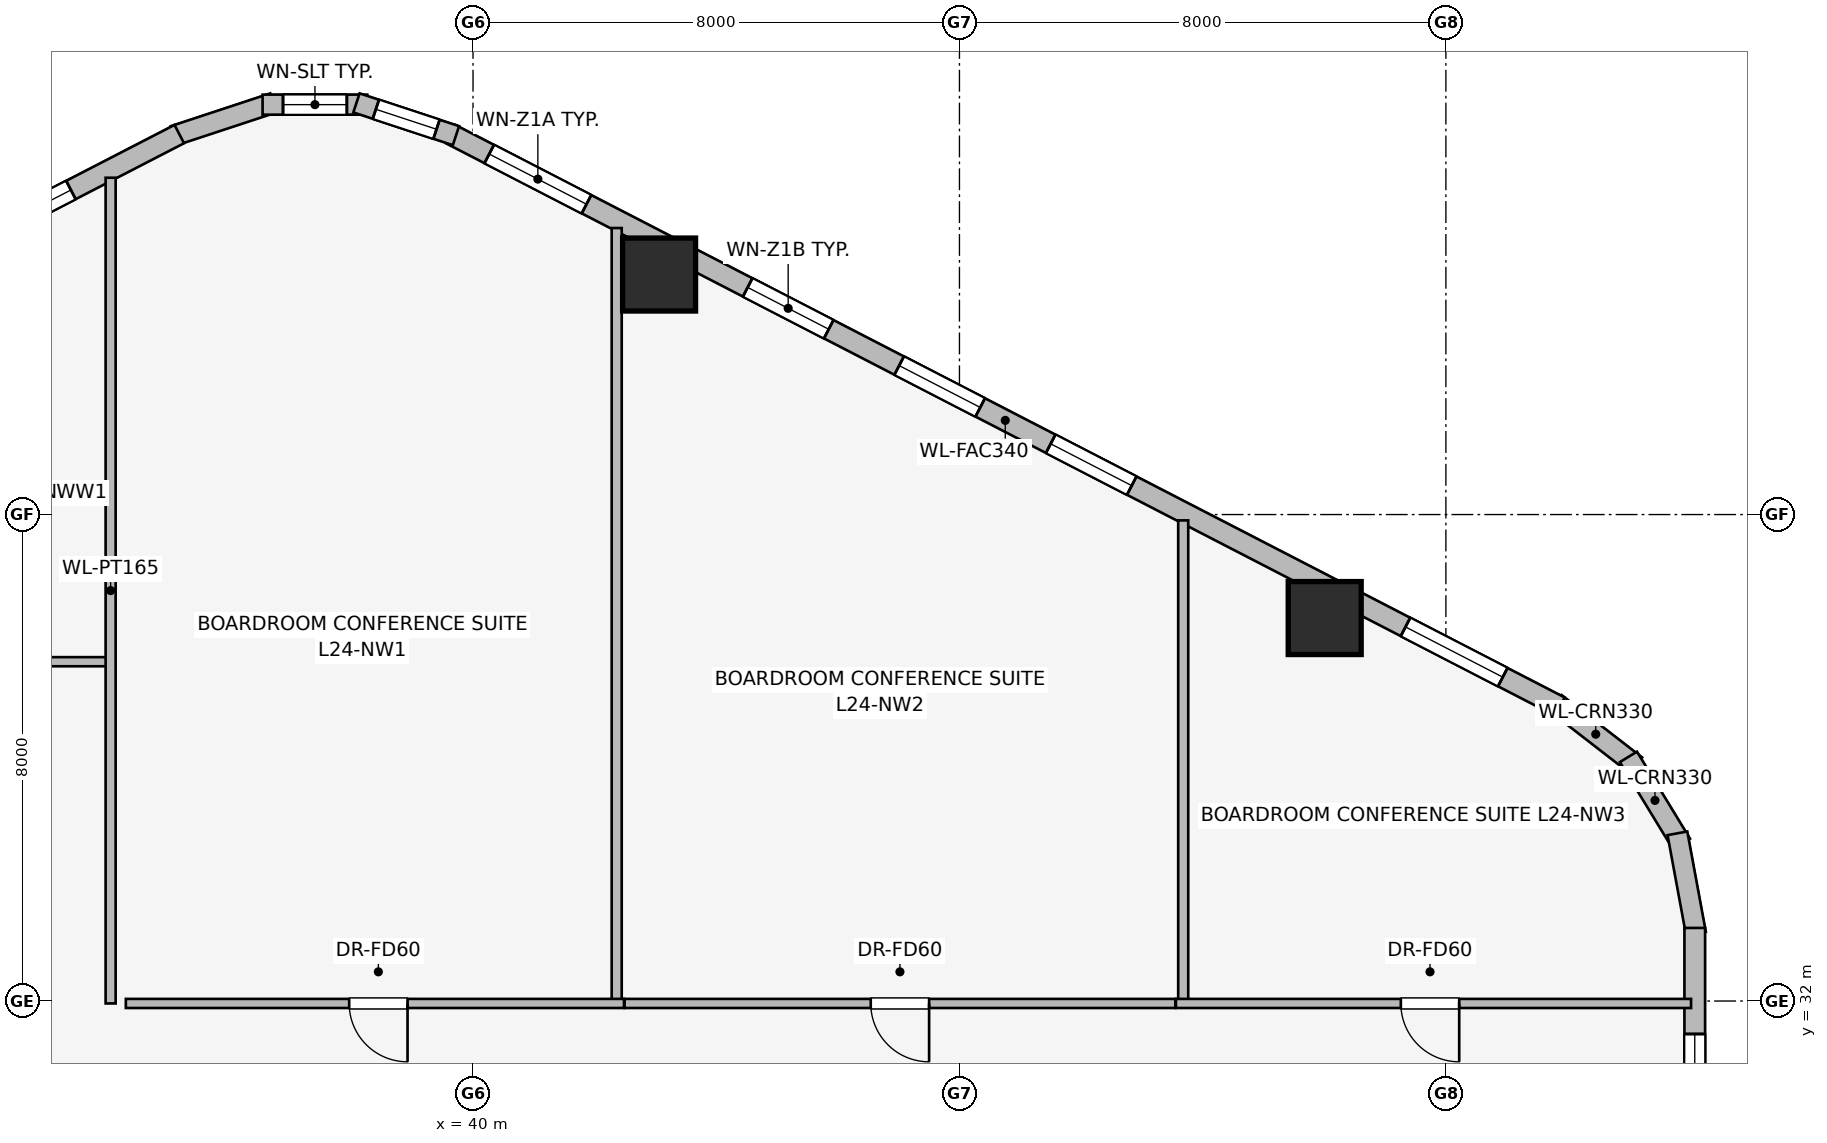
"""IFC4 building model, lengths in metres.
Left out: names, types, materials, properties, quantities, classifications, styles, units other than length and angle.
Written with IfcOpenShell. Run it as: python <this file> out.ifc"""

import sys

from ifc_helpers import new_model, si_unit, direction, frame, frame_2d, origin, origin_2d, place, context, subcontext, project, spatial, rectangle, extrude, element, fill, save


model = new_model("IFC4")
c1 = context("Model", 3, precision=1e-05, world=origin(), true_north=direction((0.0, 1.0)))
c2 = subcontext(c1, "Body", "Model", "MODEL_VIEW")
j1 = project(units=[si_unit("LENGTHUNIT", "METRE"), si_unit("PLANEANGLEUNIT", "RADIAN")], contexts=[c1])
p1 = place(None, origin())
s1 = spatial("IfcSite", under=j1, at=p1, CompositionType="ELEMENT")
p2 = place(p1, origin())
s2 = spatial("IfcBuilding", under=s1, at=p2, CompositionType="ELEMENT")
p3 = place(p2, frame((0.0, 0.0, 92.7)))
s3 = spatial("IfcBuildingStorey", under=s2, at=p3, CompositionType="ELEMENT", Elevation=92.7)
for number, where, z_axis, x_axis in (
    (1, (54.007, 38.298, 0.0), (0.0, 0.0, 1.0), (1.0, 0.0, 0.0)),
    (2, (43.06, 43.947, 0.0), (0.0, 0.0, 1.0), (1.0, 0.0, 0.0)),
):
    element("IfcColumn", number, at=place(p3, frame(where, z_axis=z_axis, x_axis=x_axis)), inside=s3, PredefinedType="COLUMN", context=c2, shape_type="SweptSolid", body=[
        extrude(rectangle(XDim=1.2, YDim=1.2, at=origin_2d()), origin(), (0.0, 0.0, 1.0), 3.65),
    ])
p4 = place(p3, frame((57.802, 36.901, 0.0), z_axis=(0.0, 0.0, 1.0), x_axis=(0.790691856293, -0.61221433207, 0.0)))
e3 = element("IfcWall", 3, at=p4, inside=s3, PredefinedType="STANDARD", context=c2, shape_type="SweptSolid", body=[
    extrude(rectangle(XDim=1.676, YDim=0.33, at=frame_2d((0.838, 0.0))), origin(), (0.0, 0.0, 1.0), 3.34),
])
p5 = place(p3, frame((59.002, 36.015, 0.0), z_axis=(0.0, 0.0, 1.0), x_axis=(0.520584129191, -0.853810379671, 0.0)))
e4 = element("IfcWall", 4, at=p5, inside=s3, PredefinedType="STANDARD", context=c2, shape_type="SweptSolid", body=[
    extrude(rectangle(XDim=1.677, YDim=0.33, at=frame_2d((0.838, 0.0))), origin(), (0.0, 0.0, 1.0), 3.34),
])
p6 = place(p3, frame((59.808, 34.758, 0.0), z_axis=(0.0, 0.0, 1.0), x_axis=(0.181714143354, -0.983351397063, 0.0)))
e5 = element("IfcWall", 5, at=p6, inside=s3, PredefinedType="STANDARD", context=c2, shape_type="SweptSolid", body=[
    extrude(rectangle(XDim=1.678, YDim=0.33, at=frame_2d((0.839, 0.0))), origin(), (0.0, 0.0, 1.0), 3.34),
])
p7 = place(p3, frame((39.631, 46.257, 0.0), z_axis=(0.0, 0.0, 1.0), x_axis=(0.888634413993, -0.458616264721, 0.0)))
e6 = element("IfcWall", 6, at=p7, inside=s3, PredefinedType="STANDARD", context=c2, shape_type="SweptSolid", body=[
    extrude(rectangle(XDim=20.531, YDim=0.34, at=frame_2d((10.266, 0.0))), origin(), (0.0, 0.0, 1.0), 2.634),
])
p8 = place(p7, frame((0.715, 0.0, 0.75)))
e7 = element("IfcOpeningElement", 7, at=p8, cuts=e6, PredefinedType="OPENING", context=c2, shape_type="SweptSolid", body=[
    extrude(rectangle(XDim=1.8, YDim=1.5, at=frame_2d((0.9, 0.75))), frame((0.0, 0.18, 0.0), z_axis=(0.0, -1.0, 0.0), x_axis=(1.0, 0.0, 0.0)), (0.0, 0.0, 1.0), 0.36),
])
p9 = place(p7, frame((5.498, 0.0, 0.75)))
e8 = element("IfcOpeningElement", 8, at=p9, cuts=e6, PredefinedType="OPENING", context=c2, shape_type="SweptSolid", body=[
    extrude(rectangle(XDim=1.5, YDim=1.5, at=frame_2d((0.75, 0.75))), frame((0.0, 0.18, 0.0), z_axis=(0.0, -1.0, 0.0), x_axis=(1.0, 0.0, 0.0)), (0.0, 0.0, 1.0), 0.36),
])
p10 = place(p7, frame((8.302, 0.0, 0.75)))
e9 = element("IfcOpeningElement", 9, at=p10, cuts=e6, PredefinedType="OPENING", context=c2, shape_type="SweptSolid", body=[
    extrude(rectangle(XDim=1.5, YDim=1.5, at=frame_2d((0.75, 0.75))), frame((0.0, 0.18, 0.0), z_axis=(0.0, -1.0, 0.0), x_axis=(1.0, 0.0, 0.0)), (0.0, 0.0, 1.0), 0.36),
])
p11 = place(p7, frame((11.106, 0.0, 0.75)))
e10 = element("IfcOpeningElement", 10, at=p11, cuts=e6, PredefinedType="OPENING", context=c2, shape_type="SweptSolid", body=[
    extrude(rectangle(XDim=1.5, YDim=1.5, at=frame_2d((0.75, 0.75))), frame((0.0, 0.18, 0.0), z_axis=(0.0, -1.0, 0.0), x_axis=(1.0, 0.0, 0.0)), (0.0, 0.0, 1.0), 0.36),
])
p12 = place(p7, frame((17.673, 0.0, 0.75)))
e11 = element("IfcOpeningElement", 11, at=p12, cuts=e6, PredefinedType="OPENING", context=c2, shape_type="SweptSolid", body=[
    extrude(rectangle(XDim=1.8, YDim=1.5, at=frame_2d((0.9, 0.75))), frame((0.0, 0.18, 0.0), z_axis=(0.0, -1.0, 0.0), x_axis=(1.0, 0.0, 0.0)), (0.0, 0.0, 1.0), 0.36),
])
p13 = place(p3, frame((35.081, 46.231, 0.0), z_axis=(0.0, 0.0, 1.0), x_axis=(0.94976901097, 0.312951794691, 0.0)))
e12 = element("IfcWall", 12, at=p13, inside=s3, PredefinedType="STANDARD", context=c2, shape_type="SweptSolid", body=[
    extrude(rectangle(XDim=1.722, YDim=0.33, at=frame_2d((0.861, 0.0))), origin(), (0.0, 0.0, 1.0), 3.34),
])
p14 = place(p3, frame((36.539, 46.741, 0.0), z_axis=(0.0, 0.0, 1.0), x_axis=(1.0, 0.0, 0.0)))
e13 = element("IfcWall", 13, at=p14, inside=s3, PredefinedType="STANDARD", context=c2, shape_type="SweptSolid", body=[
    extrude(rectangle(XDim=1.722, YDim=0.33, at=frame_2d((0.861, 0.0))), origin(), (0.0, 0.0, 1.0), 3.34),
])
p15 = place(p14, frame((0.336, 0.0, 0.75)))
e14 = element("IfcOpeningElement", 14, at=p15, cuts=e13, PredefinedType="OPENING", context=c2, shape_type="SweptSolid", body=[
    extrude(rectangle(XDim=1.05, YDim=1.4, at=frame_2d((0.525, 0.7))), frame((0.0, 0.175, 0.0), z_axis=(0.0, -1.0, 0.0), x_axis=(1.0, 0.0, 0.0)), (0.0, 0.0, 1.0), 0.35),
])
p16 = place(p3, frame((38.083, 46.77, 0.0), z_axis=(0.0, 0.0, 1.0), x_axis=(0.94976901097, -0.312951794691, 0.0)))
e15 = element("IfcWall", 15, at=p16, inside=s3, PredefinedType="STANDARD", context=c2, shape_type="SweptSolid", body=[
    extrude(rectangle(XDim=1.722, YDim=0.33, at=frame_2d((0.861, 0.0))), origin(), (0.0, 0.0, 1.0), 3.34),
])
p17 = place(p16, frame((0.336, 0.0, 0.75)))
e16 = element("IfcOpeningElement", 16, at=p17, cuts=e15, PredefinedType="OPENING", context=c2, shape_type="SweptSolid", body=[
    extrude(rectangle(XDim=1.05, YDim=1.4, at=frame_2d((0.525, 0.7))), frame((0.0, 0.175, 0.0), z_axis=(0.0, -1.0, 0.0), x_axis=(1.0, 0.0, 0.0)), (0.0, 0.0, 1.0), 0.35),
])
p18 = place(p3, frame((16.924, 36.841, 0.0), z_axis=(0.0, 0.0, 1.0), x_axis=(0.888634413993, 0.458616264721, 0.0)))
e17 = element("IfcWall", 17, at=p18, inside=s3, PredefinedType="STANDARD", context=c2, shape_type="SweptSolid", body=[
    extrude(rectangle(XDim=20.531, YDim=0.34, at=frame_2d((10.266, 0.0))), origin(), (0.0, 0.0, 1.0), 2.634),
])
p19 = place(p18, frame((2.161, 0.0, 0.75)))
e18 = element("IfcOpeningElement", 18, at=p19, cuts=e17, PredefinedType="OPENING", context=c2, shape_type="SweptSolid", body=[
    extrude(rectangle(XDim=1.05, YDim=1.4, at=frame_2d((0.525, 0.7))), frame((0.0, 0.18, 0.0), z_axis=(0.0, -1.0, 0.0), x_axis=(1.0, 0.0, 0.0)), (0.0, 0.0, 1.0), 0.36),
])
p20 = place(p18, frame((5.903, 0.0, 0.75)))
e19 = element("IfcOpeningElement", 19, at=p20, cuts=e17, PredefinedType="OPENING", context=c2, shape_type="SweptSolid", body=[
    extrude(rectangle(XDim=1.5, YDim=1.5, at=frame_2d((0.75, 0.75))), frame((0.0, 0.18, 0.0), z_axis=(0.0, -1.0, 0.0), x_axis=(1.0, 0.0, 0.0)), (0.0, 0.0, 1.0), 0.36),
])
p21 = place(p18, frame((9.516, 0.0, 0.75)))
e20 = element("IfcOpeningElement", 20, at=p21, cuts=e17, PredefinedType="OPENING", context=c2, shape_type="SweptSolid", body=[
    extrude(rectangle(XDim=1.5, YDim=1.5, at=frame_2d((0.75, 0.75))), frame((0.0, 0.18, 0.0), z_axis=(0.0, -1.0, 0.0), x_axis=(1.0, 0.0, 0.0)), (0.0, 0.0, 1.0), 0.36),
])
p22 = place(p18, frame((13.129, 0.0, 0.75)))
e21 = element("IfcOpeningElement", 21, at=p22, cuts=e17, PredefinedType="OPENING", context=c2, shape_type="SweptSolid", body=[
    extrude(rectangle(XDim=1.5, YDim=1.5, at=frame_2d((0.75, 0.75))), frame((0.0, 0.18, 0.0), z_axis=(0.0, -1.0, 0.0), x_axis=(1.0, 0.0, 0.0)), (0.0, 0.0, 1.0), 0.36),
])
p23 = place(p18, frame((17.476, 0.0, 0.75)))
e22 = element("IfcOpeningElement", 22, at=p23, cuts=e17, PredefinedType="OPENING", context=c2, shape_type="SweptSolid", body=[
    extrude(rectangle(XDim=1.05, YDim=1.4, at=frame_2d((0.525, 0.7))), frame((0.0, 0.18, 0.0), z_axis=(0.0, -1.0, 0.0), x_axis=(1.0, 0.0, 0.0)), (0.0, 0.0, 1.0), 0.36),
])
p24 = place(p3, frame((60.093, 33.202, 0.0), z_axis=(0.0, 0.0, 1.0), x_axis=(0.0, -1.0, 0.0)))
e23 = element("IfcWall", 23, at=p24, inside=s3, PredefinedType="STANDARD", context=c2, shape_type="SweptSolid", body=[
    extrude(rectangle(XDim=18.404, YDim=0.34, at=frame_2d((9.202, 0.0))), origin(), (0.0, 0.0, 1.0), 2.634),
])
p25 = place(p24, frame((1.744, 0.0, 0.75)))
e24 = element("IfcOpeningElement", 24, at=p25, cuts=e23, PredefinedType="OPENING", context=c2, shape_type="SweptSolid", body=[
    extrude(rectangle(XDim=1.05, YDim=1.4, at=frame_2d((0.525, 0.7))), frame((0.0, 0.18, 0.0), z_axis=(0.0, -1.0, 0.0), x_axis=(1.0, 0.0, 0.0)), (0.0, 0.0, 1.0), 0.36),
])
p26 = place(p24, frame((5.182, 0.0, 0.75)))
e25 = element("IfcOpeningElement", 25, at=p26, cuts=e23, PredefinedType="OPENING", context=c2, shape_type="SweptSolid", body=[
    extrude(rectangle(XDim=1.5, YDim=1.5, at=frame_2d((0.75, 0.75))), frame((0.0, 0.18, 0.0), z_axis=(0.0, -1.0, 0.0), x_axis=(1.0, 0.0, 0.0)), (0.0, 0.0, 1.0), 0.36),
])
p27 = place(p24, frame((9.058, 0.0, 0.75)))
e26 = element("IfcOpeningElement", 26, at=p27, cuts=e23, PredefinedType="OPENING", context=c2, shape_type="SweptSolid", body=[
    extrude(rectangle(XDim=1.8, YDim=1.5, at=frame_2d((0.9, 0.75))), frame((0.0, 0.18, 0.0), z_axis=(0.0, -1.0, 0.0), x_axis=(1.0, 0.0, 0.0)), (0.0, 0.0, 1.0), 0.36),
])
p28 = place(p24, frame((12.704, 0.0, 0.75)))
e27 = element("IfcOpeningElement", 27, at=p28, cuts=e23, PredefinedType="OPENING", context=c2, shape_type="SweptSolid", body=[
    extrude(rectangle(XDim=1.05, YDim=1.4, at=frame_2d((0.525, 0.7))), frame((0.0, 0.18, 0.0), z_axis=(0.0, -1.0, 0.0), x_axis=(1.0, 0.0, 0.0)), (0.0, 0.0, 1.0), 0.36),
])
p29 = place(p24, frame((15.65, 0.0, 0.75)))
e28 = element("IfcOpeningElement", 28, at=p29, cuts=e23, PredefinedType="OPENING", context=c2, shape_type="SweptSolid", body=[
    extrude(rectangle(XDim=1.05, YDim=1.4, at=frame_2d((0.525, 0.7))), frame((0.0, 0.18, 0.0), z_axis=(0.0, -1.0, 0.0), x_axis=(1.0, 0.0, 0.0)), (0.0, 0.0, 1.0), 0.36),
])
p30 = place(p3, frame((34.0, 37.58, 0.0), z_axis=(0.0, 0.0, 1.0), x_axis=(-1.0, 0.0, 0.0)))
e29 = element("IfcWall", 29, at=p30, inside=s3, PredefinedType="PARTITIONING", context=c2, shape_type="SweptSolid", body=[
    extrude(rectangle(XDim=15.6, YDim=0.15, at=frame_2d((7.8, 0.0))), origin(), (0.0, 0.0, 1.0), 3.34),
])
p31 = place(p30, frame((5.195, 0.0, 0.0)))
e30 = element("IfcOpeningElement", 30, at=p31, cuts=e29, PredefinedType="OPENING", context=c2, shape_type="SweptSolid", body=[
    extrude(rectangle(XDim=0.96, YDim=2.0, at=frame_2d((0.48, 1.0))), frame((0.0, 0.085, 0.0), z_axis=(0.0, -1.0, 0.0), x_axis=(1.0, 0.0, 0.0)), (0.0, 0.0, 1.0), 0.17),
])
p32 = place(p3, frame((34.04, 31.96, 0.0), z_axis=(0.0, 0.0, 1.0), x_axis=(0.0, 1.0, 0.0)))
e31 = element("IfcWall", 31, at=p32, inside=s3, PredefinedType="PARTITIONING", context=c2, shape_type="SweptSolid", body=[
    extrude(rectangle(XDim=13.579, YDim=0.165, at=frame_2d((6.79, 0.0))), origin(), (0.0, 0.0, 1.0), 3.34),
])
p33 = place(p3, frame((42.363, 31.97, 0.0), z_axis=(0.0, 0.0, 1.0), x_axis=(0.0, 1.0, 0.0)))
e32 = element("IfcWall", 32, at=p33, inside=s3, PredefinedType="PARTITIONING", context=c2, shape_type="SweptSolid", body=[
    extrude(rectangle(XDim=12.742, YDim=0.165, at=frame_2d((6.371, 0.0))), origin(), (0.0, 0.0, 1.0), 3.34),
])
p34 = place(p3, frame((51.68, 31.97, 0.0), z_axis=(0.0, 0.0, 1.0), x_axis=(0.0, 1.0, 0.0)))
e33 = element("IfcWall", 33, at=p34, inside=s3, PredefinedType="PARTITIONING", context=c2, shape_type="SweptSolid", body=[
    extrude(rectangle(XDim=7.934, YDim=0.165, at=frame_2d((3.967, 0.0))), origin(), (0.0, 0.0, 1.0), 3.34),
])
p35 = place(p3, frame((42.483, 31.96, 0.0), z_axis=(0.0, 0.0, 1.0), x_axis=(-1.0, 0.0, 0.0)))
e34 = element("IfcWall", 34, at=p35, inside=s3, PredefinedType="PARTITIONING", context=c2, shape_type="SweptSolid", body=[
    extrude(rectangle(XDim=8.193, YDim=0.15, at=frame_2d((4.096, 0.0))), origin(), (0.0, 0.0, 1.0), 3.34),
])
p36 = place(p35, frame((3.56, 0.0, 0.0)))
e35 = element("IfcOpeningElement", 35, at=p36, cuts=e34, PredefinedType="OPENING", context=c2, shape_type="SweptSolid", body=[
    extrude(rectangle(XDim=0.96, YDim=2.0, at=frame_2d((0.48, 1.0))), frame((0.0, 0.085, 0.0), z_axis=(0.0, -1.0, 0.0), x_axis=(1.0, 0.0, 0.0)), (0.0, 0.0, 1.0), 0.17),
])
p37 = place(p3, frame((51.55, 31.96, 0.0), z_axis=(0.0, 0.0, 1.0), x_axis=(-1.0, 0.0, 0.0)))
e36 = element("IfcWall", 36, at=p37, inside=s3, PredefinedType="PARTITIONING", context=c2, shape_type="SweptSolid", body=[
    extrude(rectangle(XDim=9.057, YDim=0.15, at=frame_2d((4.529, 0.0))), origin(), (0.0, 0.0, 1.0), 3.34),
])
p38 = place(p37, frame((4.049, 0.0, 0.0)))
e37 = element("IfcOpeningElement", 37, at=p38, cuts=e36, PredefinedType="OPENING", context=c2, shape_type="SweptSolid", body=[
    extrude(rectangle(XDim=0.96, YDim=2.0, at=frame_2d((0.48, 1.0))), frame((0.0, 0.085, 0.0), z_axis=(0.0, -1.0, 0.0), x_axis=(1.0, 0.0, 0.0)), (0.0, 0.0, 1.0), 0.17),
])
p39 = place(p3, frame((60.032, 31.96, 0.0), z_axis=(0.0, 0.0, 1.0), x_axis=(-1.0, 0.0, 0.0)))
e38 = element("IfcWall", 38, at=p39, inside=s3, PredefinedType="PARTITIONING", context=c2, shape_type="SweptSolid", body=[
    extrude(rectangle(XDim=8.472, YDim=0.15, at=frame_2d((4.236, 0.0))), origin(), (0.0, 0.0, 1.0), 3.34),
])
p40 = place(p39, frame((3.813, 0.0, 0.0)))
e39 = element("IfcOpeningElement", 39, at=p40, cuts=e38, PredefinedType="OPENING", context=c2, shape_type="SweptSolid", body=[
    extrude(rectangle(XDim=0.96, YDim=2.0, at=frame_2d((0.48, 1.0))), frame((0.0, 0.085, 0.0), z_axis=(0.0, -1.0, 0.0), x_axis=(1.0, 0.0, 0.0)), (0.0, 0.0, 1.0), 0.17),
])
p41 = place(p8, origin())
e40 = element("IfcWindow", 40, at=p41, inside=s3, PartitioningType="SINGLE_PANEL", PredefinedType="WINDOW", context=c2, shape_type="SweptSolid", body=[
    extrude(rectangle(XDim=1.8, YDim=1.5, at=frame_2d((0.9, 0.75))), frame((0.0, 0.03, 0.0), z_axis=(0.0, -1.0, 0.0), x_axis=(1.0, 0.0, 0.0)), (0.0, 0.0, 1.0), 0.06),
])
fill(e7, e40)
p42 = place(p9, origin())
e41 = element("IfcWindow", 41, at=p42, inside=s3, PartitioningType="SINGLE_PANEL", PredefinedType="WINDOW", context=c2, shape_type="SweptSolid", body=[
    extrude(rectangle(XDim=1.5, YDim=1.5, at=frame_2d((0.75, 0.75))), frame((0.0, 0.03, 0.0), z_axis=(0.0, -1.0, 0.0), x_axis=(1.0, 0.0, 0.0)), (0.0, 0.0, 1.0), 0.06),
])
fill(e8, e41)
p43 = place(p10, origin())
e42 = element("IfcWindow", 42, at=p43, inside=s3, PartitioningType="SINGLE_PANEL", PredefinedType="WINDOW", context=c2, shape_type="SweptSolid", body=[
    extrude(rectangle(XDim=1.5, YDim=1.5, at=frame_2d((0.75, 0.75))), frame((0.0, 0.03, 0.0), z_axis=(0.0, -1.0, 0.0), x_axis=(1.0, 0.0, 0.0)), (0.0, 0.0, 1.0), 0.06),
])
fill(e9, e42)
p44 = place(p11, origin())
e43 = element("IfcWindow", 43, at=p44, inside=s3, PartitioningType="SINGLE_PANEL", PredefinedType="WINDOW", context=c2, shape_type="SweptSolid", body=[
    extrude(rectangle(XDim=1.5, YDim=1.5, at=frame_2d((0.75, 0.75))), frame((0.0, 0.03, 0.0), z_axis=(0.0, -1.0, 0.0), x_axis=(1.0, 0.0, 0.0)), (0.0, 0.0, 1.0), 0.06),
])
fill(e10, e43)
p45 = place(p12, origin())
e44 = element("IfcWindow", 44, at=p45, inside=s3, PartitioningType="SINGLE_PANEL", PredefinedType="WINDOW", context=c2, shape_type="SweptSolid", body=[
    extrude(rectangle(XDim=1.8, YDim=1.5, at=frame_2d((0.9, 0.75))), frame((0.0, 0.03, 0.0), z_axis=(0.0, -1.0, 0.0), x_axis=(1.0, 0.0, 0.0)), (0.0, 0.0, 1.0), 0.06),
])
fill(e11, e44)
p46 = place(p15, origin())
e45 = element("IfcWindow", 45, at=p46, inside=s3, PartitioningType="SINGLE_PANEL", PredefinedType="WINDOW", context=c2, shape_type="SweptSolid", body=[
    extrude(rectangle(XDim=1.05, YDim=1.4, at=frame_2d((0.525, 0.7))), frame((0.0, 0.03, 0.0), z_axis=(0.0, -1.0, 0.0), x_axis=(1.0, 0.0, 0.0)), (0.0, 0.0, 1.0), 0.06),
])
fill(e14, e45)
p47 = place(p17, origin())
e46 = element("IfcWindow", 46, at=p47, inside=s3, PartitioningType="SINGLE_PANEL", PredefinedType="WINDOW", context=c2, shape_type="SweptSolid", body=[
    extrude(rectangle(XDim=1.05, YDim=1.4, at=frame_2d((0.525, 0.7))), frame((0.0, 0.03, 0.0), z_axis=(0.0, -1.0, 0.0), x_axis=(1.0, 0.0, 0.0)), (0.0, 0.0, 1.0), 0.06),
])
fill(e16, e46)
p48 = place(p23, origin())
e47 = element("IfcWindow", 47, at=p48, inside=s3, PartitioningType="SINGLE_PANEL", PredefinedType="WINDOW", context=c2, shape_type="SweptSolid", body=[
    extrude(rectangle(XDim=1.05, YDim=1.4, at=frame_2d((0.525, 0.7))), frame((0.0, 0.03, 0.0), z_axis=(0.0, -1.0, 0.0), x_axis=(1.0, 0.0, 0.0)), (0.0, 0.0, 1.0), 0.06),
])
fill(e22, e47)
p49 = place(p25, origin())
e48 = element("IfcWindow", 48, at=p49, inside=s3, PartitioningType="SINGLE_PANEL", PredefinedType="WINDOW", context=c2, shape_type="SweptSolid", body=[
    extrude(rectangle(XDim=1.05, YDim=1.4, at=frame_2d((0.525, 0.7))), frame((0.0, 0.03, 0.0), z_axis=(0.0, -1.0, 0.0), x_axis=(1.0, 0.0, 0.0)), (0.0, 0.0, 1.0), 0.06),
])
fill(e24, e48)
p50 = place(p36, origin())
e49 = element("IfcDoor", 49, at=p50, inside=s3, OperationType="SINGLE_SWING_LEFT", PredefinedType="DOOR", context=c2, shape_type="SweptSolid", body=[
    extrude(rectangle(XDim=0.96, YDim=2.0, at=frame_2d((0.48, 1.0))), frame((0.0, 0.025, 0.0), z_axis=(0.0, -1.0, 0.0), x_axis=(1.0, 0.0, 0.0)), (0.0, 0.0, 1.0), 0.05),
])
fill(e35, e49)
p51 = place(p38, origin())
e50 = element("IfcDoor", 50, at=p51, inside=s3, OperationType="SINGLE_SWING_LEFT", PredefinedType="DOOR", context=c2, shape_type="SweptSolid", body=[
    extrude(rectangle(XDim=0.96, YDim=2.0, at=frame_2d((0.48, 1.0))), frame((0.0, 0.025, 0.0), z_axis=(0.0, -1.0, 0.0), x_axis=(1.0, 0.0, 0.0)), (0.0, 0.0, 1.0), 0.05),
])
fill(e37, e50)
p52 = place(p40, origin())
e51 = element("IfcDoor", 51, at=p52, inside=s3, OperationType="SINGLE_SWING_LEFT", PredefinedType="DOOR", context=c2, shape_type="SweptSolid", body=[
    extrude(rectangle(XDim=0.96, YDim=2.0, at=frame_2d((0.48, 1.0))), frame((0.0, 0.025, 0.0), z_axis=(0.0, -1.0, 0.0), x_axis=(1.0, 0.0, 0.0)), (0.0, 0.0, 1.0), 0.05),
])
fill(e39, e51)
save(model, sys.argv[1])
